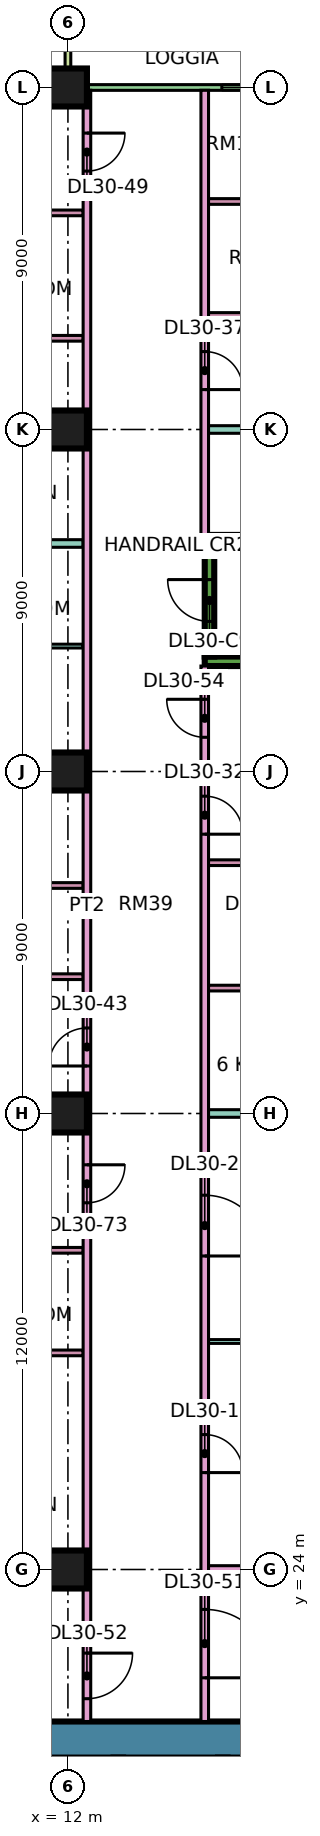
"""IFC4 building model, lengths in metres.
Left out: names, types, materials, properties, quantities, classifications, styles, units other than length and angle.
Written with IfcOpenShell. Run it as: python <this file> out.ifc"""

import sys

from ifc_helpers import new_model, si_unit, direction, frame, frame_2d, origin, origin_2d, place, context, subcontext, project, spatial, rectangle, extrude, element, fill, save


model = new_model("IFC4")
c1 = context("Model", 3, precision=1e-05, world=origin(), true_north=direction((0.0, 1.0)))
c2 = subcontext(c1, "Body", "Model", "MODEL_VIEW")
j1 = project(units=[si_unit("LENGTHUNIT", "METRE"), si_unit("PLANEANGLEUNIT", "RADIAN")], contexts=[c1])
p1 = place(None, origin())
s1 = spatial("IfcSite", under=j1, at=p1, CompositionType="ELEMENT")
p2 = place(p1, origin())
s2 = spatial("IfcBuilding", under=s1, at=p2, CompositionType="ELEMENT")
p3 = place(p2, frame((0.0, 0.0, 129.4)))
s3 = spatial("IfcBuildingStorey", under=s2, at=p3, CompositionType="ELEMENT", Elevation=129.4)
for number, where, z_axis, x_axis in (
    (1, (12.0, 24.0, 0.0), (0.0, 0.0, 1.0), (1.0, 0.0, 0.0)),
    (2, (12.0, 36.0, 0.0), (0.0, 0.0, 1.0), (1.0, 0.0, 0.0)),
    (3, (12.0, 45.0, 0.0), (0.0, 0.0, 1.0), (1.0, 0.0, 0.0)),
    (4, (12.0, 54.0, 0.0), (0.0, 0.0, 1.0), (1.0, 0.0, 0.0)),
    (5, (12.0, 63.0, 0.0), (0.0, 0.0, 1.0), (1.0, 0.0, 0.0)),
):
    element("IfcColumn", number, at=place(p3, frame(where, z_axis=z_axis, x_axis=x_axis)), inside=s3, PredefinedType="COLUMN", context=c2, shape_type="SweptSolid", body=[
        extrude(rectangle(XDim=1.0, YDim=1.0, at=origin_2d()), origin(), (0.0, 0.0, 1.0), 3.75),
    ])
p4 = place(p3, frame((9.0, 19.525, 0.0), z_axis=(0.0, 0.0, 1.0), x_axis=(1.0, 0.0, 0.0)))
e6 = element("IfcWall", 6, at=p4, inside=s3, PredefinedType="SHEAR", context=c2, shape_type="SweptSolid", body=[
    extrude(rectangle(XDim=25.0, YDim=0.95, at=frame_2d((12.5, 0.0))), origin(), (0.0, 0.0, 1.0), 3.75),
])
p5 = place(p4, frame((19.1, 0.0, 0.0)))
e7 = element("IfcOpeningElement", 7, at=p5, cuts=e6, PredefinedType="OPENING", context=c2, shape_type="SweptSolid", body=[
    extrude(rectangle(XDim=1.8, YDim=2.4, at=frame_2d((0.9, 1.2))), frame((0.0, 0.485, 0.0), z_axis=(0.0, -1.0, 0.0), x_axis=(1.0, 0.0, 0.0)), (0.0, 0.0, 1.0), 0.97),
])
for number, where, z_axis, x_axis in (
    (8, (15.6, 47.9, 0.0), (0.0, 0.0, 1.0), (1.0, 0.0, 0.0)),
    (9, (15.6, 51.1, 0.0), (0.0, 0.0, 1.0), (1.0, 0.0, 0.0)),
):
    element("IfcWall", number, at=place(p3, frame(where, z_axis=z_axis, x_axis=x_axis)), inside=s3, PredefinedType="SHEAR", context=c2, shape_type="SweptSolid", body=[
        extrude(rectangle(XDim=7.0, YDim=0.25, at=frame_2d((3.5, 0.0))), origin(), (0.0, 0.0, 1.0), 3.75),
    ])
p6 = place(p3, frame((15.725, 48.025, 0.0), z_axis=(0.0, 0.0, 1.0), x_axis=(0.0, 1.0, 0.0)))
e10 = element("IfcWall", 10, at=p6, inside=s3, PredefinedType="SHEAR", context=c2, shape_type="SweptSolid", body=[
    extrude(rectangle(XDim=2.95, YDim=0.25, at=frame_2d((1.475, 0.0))), origin(), (0.0, 0.0, 1.0), 3.75),
])
p7 = place(p6, frame((0.925, 0.0, 0.0)))
e11 = element("IfcOpeningElement", 11, at=p7, cuts=e10, PredefinedType="OPENING", context=c2, shape_type="SweptSolid", body=[
    extrude(rectangle(XDim=1.1, YDim=2.2, at=frame_2d((0.55, 1.1))), frame((0.0, 0.135, 0.0), z_axis=(0.0, -1.0, 0.0), x_axis=(1.0, 0.0, 0.0)), (0.0, 0.0, 1.0), 0.27),
])
p8 = place(p3, frame((22.425, 63.0, 0.0), z_axis=(0.0, 0.0, 1.0), x_axis=(-1.0, 0.0, 0.0)))
e12 = element("IfcWall", 12, at=p8, inside=s3, PredefinedType="SOLIDWALL", context=c2, shape_type="SweptSolid", body=[
    extrude(rectangle(XDim=10.35, YDim=0.15, at=frame_2d((5.175, 0.0))), origin(), (0.0, 0.0, 1.0), 3.35),
])
p9 = place(p8, frame((0.562, 0.0, 0.45)))
e13 = element("IfcOpeningElement", 13, at=p9, cuts=e12, PredefinedType="OPENING", context=c2, shape_type="SweptSolid", body=[
    extrude(rectangle(XDim=1.8, YDim=2.4, at=frame_2d((0.9, 1.2))), frame((0.0, 0.085, 0.0), z_axis=(0.0, -1.0, 0.0), x_axis=(1.0, 0.0, 0.0)), (0.0, 0.0, 1.0), 0.17),
])
p10 = place(p8, frame((4.575, 0.0, 0.45)))
e14 = element("IfcOpeningElement", 14, at=p10, cuts=e12, PredefinedType="OPENING", context=c2, shape_type="SweptSolid", body=[
    extrude(rectangle(XDim=1.8, YDim=2.4, at=frame_2d((0.9, 1.2))), frame((0.0, 0.085, 0.0), z_axis=(0.0, -1.0, 0.0), x_axis=(1.0, 0.0, 0.0)), (0.0, 0.0, 1.0), 0.17),
])
p11 = place(p3, frame((12.0, 64.5, 0.0), z_axis=(0.0, 0.0, 1.0), x_axis=(0.0, -1.0, 0.0)))
e15 = element("IfcWall", 15, at=p11, inside=s3, PredefinedType="SOLIDWALL", context=c2, shape_type="SweptSolid", body=[
    extrude(rectangle(XDim=1.5, YDim=0.15, at=frame_2d((0.75, 0.0))), origin(), (0.0, 0.0, 1.0), 3.35),
])
p12 = place(p3, frame((0.0, 36.0, 0.0), z_axis=(0.0, 0.0, 1.0), x_axis=(1.0, 0.0, 0.0)))
e16 = element("IfcWall", 16, at=p12, inside=s3, PredefinedType="PARTITIONING", context=c2, shape_type="SweptSolid", body=[
    extrude(rectangle(XDim=12.4, YDim=0.2, at=frame_2d((6.2, 0.0))), origin(), (0.0, 0.0, 1.0), 3.35),
])
p13 = place(p3, frame((-1.35, 51.0, 0.0), z_axis=(0.0, 0.0, 1.0), x_axis=(1.0, 0.0, 0.0)))
e17 = element("IfcWall", 17, at=p13, inside=s3, PredefinedType="PARTITIONING", context=c2, shape_type="SweptSolid", body=[
    extrude(rectangle(XDim=13.75, YDim=0.2, at=frame_2d((6.875, 0.0))), origin(), (0.0, 0.0, 1.0), 3.35),
])
p14 = place(p3, frame((0.074, 22.4, 0.0), z_axis=(0.0, 0.0, 1.0), x_axis=(1.0, 0.0, 0.0)))
e18 = element("IfcWall", 18, at=p14, inside=s3, PredefinedType="PARTITIONING", context=c2, shape_type="SweptSolid", body=[
    extrude(rectangle(XDim=12.326, YDim=0.2, at=frame_2d((6.163, 0.0))), origin(), (0.0, 0.0, 1.0), 3.35),
])
for number, where, z_axis, x_axis in (
    (19, (7.775, 39.6, 0.0), (0.0, 0.0, 1.0), (1.0, 0.0, 0.0)),
    (20, (7.775, 42.0, 0.0), (0.0, 0.0, 1.0), (1.0, 0.0, 0.0)),
):
    element("IfcWall", number, at=place(p3, frame(where, z_axis=z_axis, x_axis=x_axis)), inside=s3, PredefinedType="PARTITIONING", context=c2, shape_type="SweptSolid", body=[
        extrude(rectangle(XDim=4.625, YDim=0.15, at=frame_2d((2.312, 0.0))), origin(), (0.0, 0.0, 1.0), 3.35),
    ])
p15 = place(p3, frame((7.775, 48.3, 0.0), z_axis=(0.0, 0.0, 1.0), x_axis=(1.0, 0.0, 0.0)))
e21 = element("IfcWall", 21, at=p15, inside=s3, PredefinedType="PARTITIONING", context=c2, shape_type="SweptSolid", body=[
    extrude(rectangle(XDim=4.625, YDim=0.1, at=frame_2d((2.312, 0.0))), origin(), (0.0, 0.0, 1.0), 3.35),
])
for number, where, z_axis, x_axis in (
    (22, (8.375, 29.7, 0.0), (0.0, 0.0, 1.0), (1.0, 0.0, 0.0)),
    (23, (8.375, 32.4, 0.0), (0.0, 0.0, 1.0), (1.0, 0.0, 0.0)),
    (24, (8.375, 56.4, 0.0), (0.0, 0.0, 1.0), (1.0, 0.0, 0.0)),
):
    element("IfcWall", number, at=place(p3, frame(where, z_axis=z_axis, x_axis=x_axis)), inside=s3, PredefinedType="PARTITIONING", context=c2, shape_type="SweptSolid", body=[
        extrude(rectangle(XDim=4.025, YDim=0.15, at=frame_2d((2.012, 0.0))), origin(), (0.0, 0.0, 1.0), 3.35),
    ])
p16 = place(p3, frame((8.375, 59.7, 0.0), z_axis=(0.0, 0.0, 1.0), x_axis=(1.0, 0.0, 0.0)))
e25 = element("IfcWall", 25, at=p16, inside=s3, PredefinedType="PARTITIONING", context=c2, shape_type="SweptSolid", body=[
    extrude(rectangle(XDim=4.025, YDim=0.15, at=frame_2d((2.012, 0.0))), origin(), (0.0, 0.0, 1.0), 3.35),
])
p17 = place(p16, frame((1.575, 0.0, 0.0)))
e26 = element("IfcOpeningElement", 26, at=p17, cuts=e25, PredefinedType="OPENING", context=c2, shape_type="SweptSolid", body=[
    extrude(rectangle(XDim=0.8, YDim=2.1, at=frame_2d((0.4, 1.05))), frame((0.0, 0.085, 0.0), z_axis=(0.0, -1.0, 0.0), x_axis=(1.0, 0.0, 0.0)), (0.0, 0.0, 1.0), 0.17),
])
p18 = place(p3, frame((12.5, 20.0, 0.0), z_axis=(0.0, 0.0, 1.0), x_axis=(0.0, 1.0, 0.0)))
e27 = element("IfcWall", 27, at=p18, inside=s3, PredefinedType="PARTITIONING", context=c2, shape_type="SweptSolid", body=[
    extrude(rectangle(XDim=42.926, YDim=0.2, at=frame_2d((21.463, 0.0))), origin(), (0.0, 0.0, 1.0), 3.35),
])
p19 = place(p18, frame((17.25, 0.0, 0.0)))
e28 = element("IfcOpeningElement", 28, at=p19, cuts=e27, PredefinedType="OPENING", context=c2, shape_type="SweptSolid", body=[
    extrude(rectangle(XDim=1.0, YDim=2.1, at=frame_2d((0.5, 1.05))), frame((0.0, 0.11, 0.0), z_axis=(0.0, -1.0, 0.0), x_axis=(1.0, 0.0, 0.0)), (0.0, 0.0, 1.0), 0.22),
])
p20 = place(p18, frame((40.8, 0.0, 0.0)))
e29 = element("IfcOpeningElement", 29, at=p20, cuts=e27, PredefinedType="OPENING", context=c2, shape_type="SweptSolid", body=[
    extrude(rectangle(XDim=1.0, YDim=2.1, at=frame_2d((0.5, 1.05))), frame((0.0, 0.11, 0.0), z_axis=(0.0, -1.0, 0.0), x_axis=(1.0, 0.0, 0.0)), (0.0, 0.0, 1.0), 0.22),
])
p21 = place(p18, frame((0.6, 0.0, 0.0)))
e30 = element("IfcOpeningElement", 30, at=p21, cuts=e27, PredefinedType="OPENING", context=c2, shape_type="SweptSolid", body=[
    extrude(rectangle(XDim=1.2, YDim=2.1, at=frame_2d((0.6, 1.05))), frame((0.0, 0.11, 0.0), z_axis=(0.0, -1.0, 0.0), x_axis=(1.0, 0.0, 0.0)), (0.0, 0.0, 1.0), 0.22),
])
p22 = place(p18, frame((13.65, 0.0, 0.0)))
e31 = element("IfcOpeningElement", 31, at=p22, cuts=e27, PredefinedType="OPENING", context=c2, shape_type="SweptSolid", body=[
    extrude(rectangle(XDim=1.0, YDim=2.1, at=frame_2d((0.5, 1.05))), frame((0.0, 0.11, 0.0), z_axis=(0.0, -1.0, 0.0), x_axis=(1.0, 0.0, 0.0)), (0.0, 0.0, 1.0), 0.22),
])
p23 = place(p3, frame((15.6, 20.0, 0.0), z_axis=(0.0, 0.0, 1.0), x_axis=(0.0, 1.0, 0.0)))
e32 = element("IfcWall", 32, at=p23, inside=s3, PredefinedType="PARTITIONING", context=c2, shape_type="SweptSolid", body=[
    extrude(rectangle(XDim=27.775, YDim=0.2, at=frame_2d((13.887, 0.0))), origin(), (0.0, 0.0, 1.0), 3.35),
])
p24 = place(p23, frame((6.55, 0.0, 0.0)))
e33 = element("IfcOpeningElement", 33, at=p24, cuts=e32, PredefinedType="OPENING", context=c2, shape_type="SweptSolid", body=[
    extrude(rectangle(XDim=1.0, YDim=2.1, at=frame_2d((0.5, 1.05))), frame((0.0, 0.11, 0.0), z_axis=(0.0, -1.0, 0.0), x_axis=(1.0, 0.0, 0.0)), (0.0, 0.0, 1.0), 0.22),
])
p25 = place(p23, frame((12.25, 0.0, 0.0)))
e34 = element("IfcOpeningElement", 34, at=p25, cuts=e32, PredefinedType="OPENING", context=c2, shape_type="SweptSolid", body=[
    extrude(rectangle(XDim=1.6, YDim=2.1, at=frame_2d((0.8, 1.05))), frame((0.0, 0.11, 0.0), z_axis=(0.0, -1.0, 0.0), x_axis=(1.0, 0.0, 0.0)), (0.0, 0.0, 1.0), 0.22),
])
p26 = place(p23, frame((23.35, 0.0, 0.0)))
e35 = element("IfcOpeningElement", 35, at=p26, cuts=e32, PredefinedType="OPENING", context=c2, shape_type="SweptSolid", body=[
    extrude(rectangle(XDim=1.0, YDim=2.1, at=frame_2d((0.5, 1.05))), frame((0.0, 0.11, 0.0), z_axis=(0.0, -1.0, 0.0), x_axis=(1.0, 0.0, 0.0)), (0.0, 0.0, 1.0), 0.22),
])
p27 = place(p23, frame((1.15, 0.0, 0.0)))
e36 = element("IfcOpeningElement", 36, at=p27, cuts=e32, PredefinedType="OPENING", context=c2, shape_type="SweptSolid", body=[
    extrude(rectangle(XDim=1.8, YDim=2.1, at=frame_2d((0.9, 1.05))), frame((0.0, 0.11, 0.0), z_axis=(0.0, -1.0, 0.0), x_axis=(1.0, 0.0, 0.0)), (0.0, 0.0, 1.0), 0.22),
])
p28 = place(p23, frame((25.9, 0.0, 0.0)))
e37 = element("IfcOpeningElement", 37, at=p28, cuts=e32, PredefinedType="OPENING", context=c2, shape_type="SweptSolid", body=[
    extrude(rectangle(XDim=1.0, YDim=2.1, at=frame_2d((0.5, 1.05))), frame((0.0, 0.11, 0.0), z_axis=(0.0, -1.0, 0.0), x_axis=(1.0, 0.0, 0.0)), (0.0, 0.0, 1.0), 0.22),
])
p29 = place(p3, frame((15.6, 51.225, 0.0), z_axis=(0.0, 0.0, 1.0), x_axis=(0.0, 1.0, 0.0)))
e38 = element("IfcWall", 38, at=p29, inside=s3, PredefinedType="PARTITIONING", context=c2, shape_type="SweptSolid", body=[
    extrude(rectangle(XDim=11.701, YDim=0.2, at=frame_2d((5.851, 0.0))), origin(), (0.0, 0.0, 1.0), 3.35),
])
p30 = place(p29, frame((3.825, 0.0, 0.0)))
e39 = element("IfcOpeningElement", 39, at=p30, cuts=e38, PredefinedType="OPENING", context=c2, shape_type="SweptSolid", body=[
    extrude(rectangle(XDim=1.0, YDim=2.1, at=frame_2d((0.5, 1.05))), frame((0.0, 0.11, 0.0), z_axis=(0.0, -1.0, 0.0), x_axis=(1.0, 0.0, 0.0)), (0.0, 0.0, 1.0), 0.22),
])
p31 = place(p3, frame((15.7, 24.0, 0.0), z_axis=(0.0, 0.0, 1.0), x_axis=(1.0, 0.0, 0.0)))
e40 = element("IfcWall", 40, at=p31, inside=s3, PredefinedType="PARTITIONING", context=c2, shape_type="SweptSolid", body=[
    extrude(rectangle(XDim=5.8, YDim=0.2, at=frame_2d((2.9, 0.0))), origin(), (0.0, 0.0, 1.0), 3.35),
])
p32 = place(p3, frame((15.7, 30.0, 0.0), z_axis=(0.0, 0.0, 1.0), x_axis=(1.0, 0.0, 0.0)))
e41 = element("IfcWall", 41, at=p32, inside=s3, PredefinedType="PARTITIONING", context=c2, shape_type="SweptSolid", body=[
    extrude(rectangle(XDim=5.8, YDim=0.1, at=frame_2d((2.9, 0.0))), origin(), (0.0, 0.0, 1.0), 3.35),
])
p33 = place(p3, frame((15.7, 36.0, 0.0), z_axis=(0.0, 0.0, 1.0), x_axis=(1.0, 0.0, 0.0)))
e42 = element("IfcWall", 42, at=p33, inside=s3, PredefinedType="PARTITIONING", context=c2, shape_type="SweptSolid", body=[
    extrude(rectangle(XDim=8.3, YDim=0.2, at=frame_2d((4.15, 0.0))), origin(), (0.0, 0.0, 1.0), 3.35),
])
p34 = place(p3, frame((15.7, 39.3, 0.0), z_axis=(0.0, 0.0, 1.0), x_axis=(1.0, 0.0, 0.0)))
e43 = element("IfcWall", 43, at=p34, inside=s3, PredefinedType="PARTITIONING", context=c2, shape_type="SweptSolid", body=[
    extrude(rectangle(XDim=3.125, YDim=0.15, at=frame_2d((1.562, 0.0))), origin(), (0.0, 0.0, 1.0), 3.35),
])
p35 = place(p3, frame((15.7, 42.6, 0.0), z_axis=(0.0, 0.0, 1.0), x_axis=(1.0, 0.0, 0.0)))
e44 = element("IfcWall", 44, at=p35, inside=s3, PredefinedType="PARTITIONING", context=c2, shape_type="SweptSolid", body=[
    extrude(rectangle(XDim=3.125, YDim=0.15, at=frame_2d((1.562, 0.0))), origin(), (0.0, 0.0, 1.0), 3.35),
])
p36 = place(p35, frame((1.1, 0.0, 0.0)))
e45 = element("IfcOpeningElement", 45, at=p36, cuts=e44, PredefinedType="OPENING", context=c2, shape_type="SweptSolid", body=[
    extrude(rectangle(XDim=0.8, YDim=2.1, at=frame_2d((0.4, 1.05))), frame((0.0, 0.085, 0.0), z_axis=(0.0, -1.0, 0.0), x_axis=(1.0, 0.0, 0.0)), (0.0, 0.0, 1.0), 0.17),
])
p37 = place(p3, frame((15.7, 45.0, 0.0), z_axis=(0.0, 0.0, 1.0), x_axis=(1.0, 0.0, 0.0)))
e46 = element("IfcWall", 46, at=p37, inside=s3, PredefinedType="PARTITIONING", context=c2, shape_type="SweptSolid", body=[
    extrude(rectangle(XDim=8.226, YDim=0.2, at=frame_2d((4.113, 0.0))), origin(), (0.0, 0.0, 1.0), 3.35),
])
p38 = place(p3, frame((15.7, 54.0, 0.0), z_axis=(0.0, 0.0, 1.0), x_axis=(1.0, 0.0, 0.0)))
e47 = element("IfcWall", 47, at=p38, inside=s3, PredefinedType="PARTITIONING", context=c2, shape_type="SweptSolid", body=[
    extrude(rectangle(XDim=8.3, YDim=0.2, at=frame_2d((4.15, 0.0))), origin(), (0.0, 0.0, 1.0), 3.35),
])
for number, where, z_axis, x_axis in (
    (48, (15.7, 57.0, 0.0), (0.0, 0.0, 1.0), (1.0, 0.0, 0.0)),
    (49, (15.7, 60.0, 0.0), (0.0, 0.0, 1.0), (1.0, 0.0, 0.0)),
):
    element("IfcWall", number, at=place(p3, frame(where, z_axis=z_axis, x_axis=x_axis)), inside=s3, PredefinedType="PARTITIONING", context=c2, shape_type="SweptSolid", body=[
        extrude(rectangle(XDim=2.525, YDim=0.15, at=frame_2d((1.263, 0.0))), origin(), (0.0, 0.0, 1.0), 3.35),
    ])
p39 = place(p10, origin())
e50 = element("IfcWindow", 50, at=p39, inside=s3, PartitioningType="SINGLE_PANEL", PredefinedType="WINDOW", context=c2, shape_type="SweptSolid", body=[
    extrude(rectangle(XDim=1.8, YDim=2.4, at=frame_2d((0.9, 1.2))), frame((0.0, 0.03, 0.0), z_axis=(0.0, -1.0, 0.0), x_axis=(1.0, 0.0, 0.0)), (0.0, 0.0, 1.0), 0.06),
])
fill(e14, e50)
p40 = place(p7, frame((1.1, 0.0, 0.0), z_axis=(0.0, 0.0, 1.0), x_axis=(-1.0, 0.0, 0.0)))
e51 = element("IfcDoor", 51, at=p40, inside=s3, OperationType="SINGLE_SWING_RIGHT", PredefinedType="DOOR", context=c2, shape_type="SweptSolid", body=[
    extrude(rectangle(XDim=1.1, YDim=2.2, at=frame_2d((0.55, 1.1))), frame((0.0, 0.025, 0.0), z_axis=(0.0, -1.0, 0.0), x_axis=(1.0, 0.0, 0.0)), (0.0, 0.0, 1.0), 0.05),
])
fill(e11, e51)
p41 = place(p24, frame((1.0, 0.0, 0.0), z_axis=(0.0, 0.0, 1.0), x_axis=(-1.0, 0.0, 0.0)))
e52 = element("IfcDoor", 52, at=p41, inside=s3, OperationType="SINGLE_SWING_LEFT", PredefinedType="DOOR", context=c2, shape_type="SweptSolid", body=[
    extrude(rectangle(XDim=1.0, YDim=2.1, at=frame_2d((0.5, 1.05))), frame((0.0, 0.025, 0.0), z_axis=(0.0, -1.0, 0.0), x_axis=(1.0, 0.0, 0.0)), (0.0, 0.0, 1.0), 0.05),
])
fill(e33, e52)
p42 = place(p25, frame((1.6, 0.0, 0.0), z_axis=(0.0, 0.0, 1.0), x_axis=(-1.0, 0.0, 0.0)))
e53 = element("IfcDoor", 53, at=p42, inside=s3, OperationType="DOUBLE_DOOR_SINGLE_SWING", PredefinedType="DOOR", context=c2, shape_type="SweptSolid", body=[
    extrude(rectangle(XDim=1.6, YDim=2.1, at=frame_2d((0.8, 1.05))), frame((0.0, 0.025, 0.0), z_axis=(0.0, -1.0, 0.0), x_axis=(1.0, 0.0, 0.0)), (0.0, 0.0, 1.0), 0.05),
])
fill(e34, e53)
p43 = place(p26, frame((1.0, 0.0, 0.0), z_axis=(0.0, 0.0, 1.0), x_axis=(-1.0, 0.0, 0.0)))
e54 = element("IfcDoor", 54, at=p43, inside=s3, OperationType="SINGLE_SWING_LEFT", PredefinedType="DOOR", context=c2, shape_type="SweptSolid", body=[
    extrude(rectangle(XDim=1.0, YDim=2.1, at=frame_2d((0.5, 1.05))), frame((0.0, 0.025, 0.0), z_axis=(0.0, -1.0, 0.0), x_axis=(1.0, 0.0, 0.0)), (0.0, 0.0, 1.0), 0.05),
])
fill(e35, e54)
p44 = place(p30, frame((1.0, 0.0, 0.0), z_axis=(0.0, 0.0, 1.0), x_axis=(-1.0, 0.0, 0.0)))
e55 = element("IfcDoor", 55, at=p44, inside=s3, OperationType="SINGLE_SWING_LEFT", PredefinedType="DOOR", context=c2, shape_type="SweptSolid", body=[
    extrude(rectangle(XDim=1.0, YDim=2.1, at=frame_2d((0.5, 1.05))), frame((0.0, 0.025, 0.0), z_axis=(0.0, -1.0, 0.0), x_axis=(1.0, 0.0, 0.0)), (0.0, 0.0, 1.0), 0.05),
])
fill(e39, e55)
p45 = place(p19, origin())
e56 = element("IfcDoor", 56, at=p45, inside=s3, OperationType="SINGLE_SWING_LEFT", PredefinedType="DOOR", context=c2, shape_type="SweptSolid", body=[
    extrude(rectangle(XDim=1.0, YDim=2.1, at=frame_2d((0.5, 1.05))), frame((0.0, 0.025, 0.0), z_axis=(0.0, -1.0, 0.0), x_axis=(1.0, 0.0, 0.0)), (0.0, 0.0, 1.0), 0.05),
])
fill(e28, e56)
p46 = place(p20, origin())
e57 = element("IfcDoor", 57, at=p46, inside=s3, OperationType="SINGLE_SWING_RIGHT", PredefinedType="DOOR", context=c2, shape_type="SweptSolid", body=[
    extrude(rectangle(XDim=1.0, YDim=2.1, at=frame_2d((0.5, 1.05))), frame((0.0, 0.025, 0.0), z_axis=(0.0, -1.0, 0.0), x_axis=(1.0, 0.0, 0.0)), (0.0, 0.0, 1.0), 0.05),
])
fill(e29, e57)
p47 = place(p27, frame((1.8, 0.0, 0.0), z_axis=(0.0, 0.0, 1.0), x_axis=(-1.0, 0.0, 0.0)))
e58 = element("IfcDoor", 58, at=p47, inside=s3, OperationType="DOUBLE_DOOR_SINGLE_SWING", PredefinedType="DOOR", context=c2, shape_type="SweptSolid", body=[
    extrude(rectangle(XDim=1.8, YDim=2.1, at=frame_2d((0.9, 1.05))), frame((0.0, 0.025, 0.0), z_axis=(0.0, -1.0, 0.0), x_axis=(1.0, 0.0, 0.0)), (0.0, 0.0, 1.0), 0.05),
])
fill(e36, e58)
p48 = place(p21, origin())
e59 = element("IfcDoor", 59, at=p48, inside=s3, OperationType="SINGLE_SWING_RIGHT", PredefinedType="DOOR", context=c2, shape_type="SweptSolid", body=[
    extrude(rectangle(XDim=1.2, YDim=2.1, at=frame_2d((0.6, 1.05))), frame((0.0, 0.025, 0.0), z_axis=(0.0, -1.0, 0.0), x_axis=(1.0, 0.0, 0.0)), (0.0, 0.0, 1.0), 0.05),
])
fill(e30, e59)
p49 = place(p28, frame((1.0, 0.0, 0.0), z_axis=(0.0, 0.0, 1.0), x_axis=(-1.0, 0.0, 0.0)))
e60 = element("IfcDoor", 60, at=p49, inside=s3, OperationType="SINGLE_SWING_RIGHT", PredefinedType="DOOR", context=c2, shape_type="SweptSolid", body=[
    extrude(rectangle(XDim=1.0, YDim=2.1, at=frame_2d((0.5, 1.05))), frame((0.0, 0.025, 0.0), z_axis=(0.0, -1.0, 0.0), x_axis=(1.0, 0.0, 0.0)), (0.0, 0.0, 1.0), 0.05),
])
fill(e37, e60)
p50 = place(p22, origin())
e61 = element("IfcDoor", 61, at=p50, inside=s3, OperationType="SINGLE_SWING_RIGHT", PredefinedType="DOOR", context=c2, shape_type="SweptSolid", body=[
    extrude(rectangle(XDim=1.0, YDim=2.1, at=frame_2d((0.5, 1.05))), frame((0.0, 0.025, 0.0), z_axis=(0.0, -1.0, 0.0), x_axis=(1.0, 0.0, 0.0)), (0.0, 0.0, 1.0), 0.05),
])
fill(e31, e61)
save(model, sys.argv[1])
